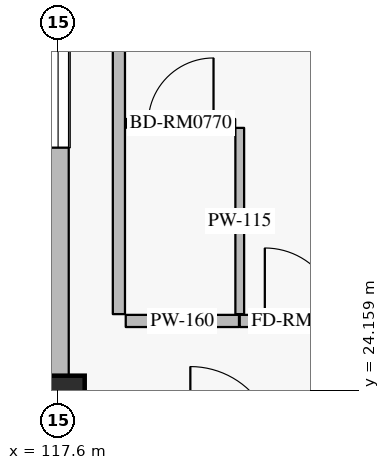
"""IFC4 building model, lengths in metres.
Left out: names, types, materials, properties, quantities, classifications, styles, units other than length and angle.
Written with IfcOpenShell. Run it as: python <this file> out.ifc"""

import sys

from ifc_helpers import new_model, si_unit, direction, frame, frame_2d, origin, origin_2d, place, context, subcontext, project, spatial, rectangle, extrude, element, fill, save


model = new_model("IFC4")
c1 = context("Model", 3, precision=1e-05, world=origin(), true_north=direction((0.0, 1.0)))
c2 = subcontext(c1, "Body", "Model", "MODEL_VIEW")
j1 = project(units=[si_unit("LENGTHUNIT", "METRE"), si_unit("PLANEANGLEUNIT", "RADIAN")], contexts=[c1])
p1 = place(None, origin())
s1 = spatial("IfcSite", under=j1, at=p1, CompositionType="ELEMENT")
p2 = place(p1, origin())
s2 = spatial("IfcBuilding", under=s1, at=p2, CompositionType="ELEMENT")
p3 = place(p2, frame((0.0, 0.0, 28.8)))
s3 = spatial("IfcBuildingStorey", under=s2, at=p3, CompositionType="ELEMENT", Elevation=28.8)
p4 = place(p3, frame((117.6, 24.0, 0.0), z_axis=(0.0, 0.0, 1.0), x_axis=(1.0, 0.0, 0.0)))
e1 = element("IfcColumn", 1, at=p4, inside=s3, PredefinedType="COLUMN", context=c2, shape_type="SweptSolid", body=[
    extrude(rectangle(XDim=0.7, YDim=0.7, at=origin_2d()), origin(), (0.0, 0.0, 1.0), 3.6),
])
p5 = place(p3, frame((117.6, 24.35, 0.0), z_axis=(0.0, 0.0, 1.0), x_axis=(0.0, 1.0, 0.0)))
e2 = element("IfcWall", 2, at=p5, inside=s3, PredefinedType="SOLIDWALL", context=c2, shape_type="SweptSolid", body=[
    extrude(rectangle(XDim=7.3, YDim=0.28, at=frame_2d((3.65, 0.0))), origin(), (0.0, 0.0, 1.0), 2.7),
])
p6 = place(p5, frame((3.0, 0.0, 0.5)))
e3 = element("IfcOpeningElement", 3, at=p6, cuts=e2, PredefinedType="OPENING", context=c2, shape_type="SweptSolid", body=[
    extrude(rectangle(XDim=1.3, YDim=1.65, at=frame_2d((0.65, 0.825))), frame((0.0, 0.15, 0.0), z_axis=(0.0, -1.0, 0.0), x_axis=(1.0, 0.0, 0.0)), (0.0, 0.0, 1.0), 0.3),
])
p7 = place(p3, frame((118.49, 25.07, 0.0), z_axis=(0.0, 0.0, 1.0), x_axis=(1.0, 0.0, 0.0)))
e4 = element("IfcWall", 4, at=p7, inside=s3, PredefinedType="PARTITIONING", context=c2, shape_type="SweptSolid", body=[
    extrude(rectangle(XDim=1.49, YDim=0.16, at=frame_2d((0.745, 0.0))), origin(), (0.0, 0.0, 1.0), 3.365),
])
p8 = place(p3, frame((119.99, 25.07, 0.0), z_axis=(0.0, 0.0, 1.0), x_axis=(1.0, 0.0, 0.0)))
e5 = element("IfcWall", 5, at=p8, inside=s3, PredefinedType="PARTITIONING", context=c2, shape_type="SweptSolid", body=[
    extrude(rectangle(XDim=1.62, YDim=0.16, at=frame_2d((0.81, 0.0))), origin(), (0.0, 0.0, 1.0), 3.365),
])
p9 = place(p8, frame((0.33, 0.0, 0.0)))
e6 = element("IfcOpeningElement", 6, at=p9, cuts=e5, PredefinedType="OPENING", context=c2, shape_type="SweptSolid", body=[
    extrude(rectangle(XDim=0.96, YDim=2.2, at=frame_2d((0.48, 1.1))), frame((0.0, 0.09, 0.0), z_axis=(0.0, -1.0, 0.0), x_axis=(1.0, 0.0, 0.0)), (0.0, 0.0, 1.0), 0.18),
])
p10 = place(p3, frame((119.99, 25.16, 0.0), z_axis=(0.0, 0.0, 1.0), x_axis=(0.0, 1.0, 0.0)))
e7 = element("IfcWall", 7, at=p10, inside=s3, PredefinedType="PARTITIONING", context=c2, shape_type="SweptSolid", body=[
    extrude(rectangle(XDim=2.45, YDim=0.115, at=frame_2d((1.225, 0.0))), origin(), (0.0, 0.0, 1.0), 3.365),
])
p11 = place(p3, frame((118.5, 27.67, 0.0), z_axis=(0.0, 0.0, 1.0), x_axis=(1.0, 0.0, 0.0)))
e8 = element("IfcWall", 8, at=p11, inside=s3, PredefinedType="PARTITIONING", context=c2, shape_type="SweptSolid", body=[
    extrude(rectangle(XDim=1.43, YDim=0.115, at=frame_2d((0.715, 0.0))), origin(), (0.0, 0.0, 1.0), 3.365),
])
p12 = place(p11, frame((0.285, 0.0, 0.0)))
e9 = element("IfcOpeningElement", 9, at=p12, cuts=e8, PredefinedType="OPENING", context=c2, shape_type="SweptSolid", body=[
    extrude(rectangle(XDim=0.86, YDim=2.12, at=frame_2d((0.43, 1.06))), frame((0.0, 0.067, 0.0), z_axis=(0.0, -1.0, 0.0), x_axis=(1.0, 0.0, 0.0)), (0.0, 0.0, 1.0), 0.135),
])
p13 = place(p3, frame((118.4, 25.16, 0.0), z_axis=(0.0, 0.0, 1.0), x_axis=(0.0, 1.0, 0.0)))
e10 = element("IfcWall", 10, at=p13, inside=s3, PredefinedType="PARTITIONING", context=c2, shape_type="SweptSolid", body=[
    extrude(rectangle(XDim=6.5, YDim=0.16, at=frame_2d((3.25, 0.0))), origin(), (0.0, 0.0, 1.0), 3.365),
])
p14 = place(p6, origin())
e11 = element("IfcWindow", 11, at=p14, inside=s3, PartitioningType="SINGLE_PANEL", PredefinedType="WINDOW", context=c2, shape_type="SweptSolid", body=[
    extrude(rectangle(XDim=1.3, YDim=1.65, at=frame_2d((0.65, 0.825))), frame((0.0, 0.03, 0.0), z_axis=(0.0, -1.0, 0.0), x_axis=(1.0, 0.0, 0.0)), (0.0, 0.0, 1.0), 0.06),
])
fill(e3, e11)
p15 = place(p9, origin())
e12 = element("IfcDoor", 12, at=p15, inside=s3, OperationType="SINGLE_SWING_LEFT", PredefinedType="DOOR", context=c2, shape_type="SweptSolid", body=[
    extrude(rectangle(XDim=0.96, YDim=2.2, at=frame_2d((0.48, 1.1))), frame((0.0, 0.025, 0.0), z_axis=(0.0, -1.0, 0.0), x_axis=(1.0, 0.0, 0.0)), (0.0, 0.0, 1.0), 0.05),
])
fill(e6, e12)
p16 = place(p12, origin())
e13 = element("IfcDoor", 13, at=p16, inside=s3, OperationType="SINGLE_SWING_RIGHT", PredefinedType="DOOR", context=c2, shape_type="SweptSolid", body=[
    extrude(rectangle(XDim=0.86, YDim=2.12, at=frame_2d((0.43, 1.06))), frame((0.0, 0.025, 0.0), z_axis=(0.0, -1.0, 0.0), x_axis=(1.0, 0.0, 0.0)), (0.0, 0.0, 1.0), 0.05),
])
fill(e9, e13)
save(model, sys.argv[1])
